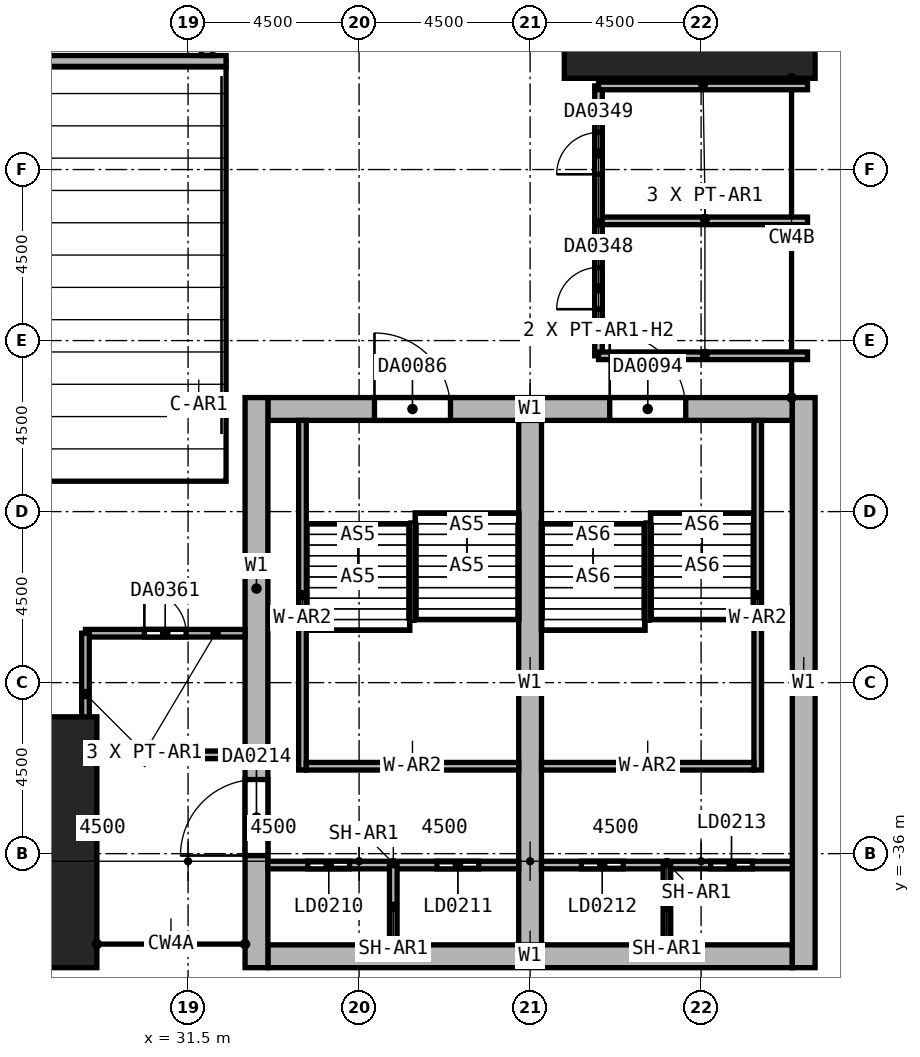
"""IFC4 building model, lengths in metres.
Left out: names, types, materials, properties, quantities, classifications, styles, units other than length and angle.
Written with IfcOpenShell. Run it as: python <this file> out.ifc"""

import sys

from ifc_helpers import new_model, si_unit, direction, frame, frame_2d, origin, origin_2d, place, context, subcontext, project, spatial, rectangle, hollow_rectangle, extrude, element, fill, save


model = new_model("IFC4")
c1 = context("Model", 3, precision=1e-05, world=origin(), true_north=direction((0.0, 1.0)))
c2 = subcontext(c1, "Body", "Model", "MODEL_VIEW")
j1 = project(units=[si_unit("LENGTHUNIT", "METRE"), si_unit("PLANEANGLEUNIT", "RADIAN")], contexts=[c1])
p1 = place(None, origin())
s1 = spatial("IfcSite", under=j1, at=p1, CompositionType="ELEMENT")
p2 = place(p1, origin())
s2 = spatial("IfcBuilding", under=s1, at=p2, CompositionType="ELEMENT")
p3 = place(p2, frame((0.0, 0.0, 12.0)))
s3 = spatial("IfcBuildingStorey", under=s2, at=p3, CompositionType="ELEMENT", Elevation=12.0)
for number, where, z_axis, x_axis in (
    (1, (27.0, -35.7, 0.0), (0.0, 0.0, 1.0), (1.0, 0.0, 0.0)),
    (2, (44.7, -13.5, 0.0), (0.0, 0.0, 1.0), (0.0, 1.0, 0.0)),
):
    element("IfcColumn", number, at=place(p3, frame(where, z_axis=z_axis, x_axis=x_axis)), inside=s3, PredefinedType="COLUMN", context=c2, shape_type="SweptSolid", body=[
        extrude(rectangle(XDim=4.2, YDim=6.6, at=origin_2d()), origin(), (0.0, 0.0, 1.0), 7.0),
    ])
p4 = place(p3, frame((33.6, -24.3, 0.0), z_axis=(0.0, 0.0, 1.0), x_axis=(1.0, 0.0, 0.0)))
e3 = element("IfcWall", 3, at=p4, inside=s3, PredefinedType="SHEAR", context=c2, shape_type="SweptSolid", body=[
    extrude(rectangle(XDim=13.8, YDim=0.6, at=frame_2d((6.9, 0.0))), origin(), (0.0, 0.0, 1.0), 7.0),
])
p5 = place(p4, frame((2.805, 0.0, 0.0)))
e4 = element("IfcOpeningElement", 4, at=p5, cuts=e3, PredefinedType="OPENING", context=c2, shape_type="SweptSolid", body=[
    extrude(rectangle(XDim=2.0, YDim=2.4, at=frame_2d((1.0, 1.2))), frame((0.0, 0.3, 0.0), z_axis=(0.0, -1.0, 0.0), x_axis=(1.0, 0.0, 0.0)), (0.0, 0.0, 1.0), 0.6),
])
p6 = place(p4, frame((8.995, 0.0, 0.0)))
e5 = element("IfcOpeningElement", 5, at=p6, cuts=e3, PredefinedType="OPENING", context=c2, shape_type="SweptSolid", body=[
    extrude(rectangle(XDim=2.0, YDim=2.4, at=frame_2d((1.0, 1.2))), frame((0.0, 0.3, 0.0), z_axis=(0.0, -1.0, 0.0), x_axis=(1.0, 0.0, 0.0)), (0.0, 0.0, 1.0), 0.6),
])
p7 = place(p3, frame((33.6, -38.7, 0.0), z_axis=(0.0, 0.0, 1.0), x_axis=(1.0, 0.0, 0.0)))
e6 = element("IfcWall", 6, at=p7, inside=s3, PredefinedType="SHEAR", context=c2, shape_type="SweptSolid", body=[
    extrude(rectangle(XDim=13.8, YDim=0.6, at=frame_2d((6.9, 0.0))), origin(), (0.0, 0.0, 1.0), 7.0),
])
p8 = place(p3, frame((33.3, -39.0, 0.0), z_axis=(0.0, 0.0, 1.0), x_axis=(0.0, 1.0, 0.0)))
e7 = element("IfcWall", 7, at=p8, inside=s3, PredefinedType="SHEAR", context=c2, shape_type="SweptSolid", body=[
    extrude(rectangle(XDim=15.0, YDim=0.6, at=frame_2d((7.5, 0.0))), origin(), (0.0, 0.0, 1.0), 7.0),
])
p9 = place(p8, frame((2.95, 0.0, 0.0)))
e8 = element("IfcOpeningElement", 8, at=p9, cuts=e7, PredefinedType="OPENING", context=c2, shape_type="SweptSolid", body=[
    extrude(rectangle(XDim=2.0, YDim=2.4, at=frame_2d((1.0, 1.2))), frame((0.0, 0.3, 0.0), z_axis=(0.0, -1.0, 0.0), x_axis=(1.0, 0.0, 0.0)), (0.0, 0.0, 1.0), 0.6),
])
p10 = place(p3, frame((47.7, -39.0, 0.0), z_axis=(0.0, 0.0, 1.0), x_axis=(0.0, 1.0, 0.0)))
e9 = element("IfcWall", 9, at=p10, inside=s3, PredefinedType="SHEAR", context=c2, shape_type="SweptSolid", body=[
    extrude(rectangle(XDim=15.0, YDim=0.6, at=frame_2d((7.5, 0.0))), origin(), (0.0, 0.0, 1.0), 7.0),
])
p11 = place(p3, frame((40.5, -38.4, 0.0), z_axis=(0.0, 0.0, 1.0), x_axis=(0.0, 1.0, 0.0)))
e10 = element("IfcWall", 10, at=p11, inside=s3, PredefinedType="SHEAR", context=c2, shape_type="SweptSolid", body=[
    extrude(rectangle(XDim=13.8, YDim=0.6, at=frame_2d((6.9, 0.0))), origin(), (0.0, 0.0, 1.0), 7.0),
])
p12 = place(p3, frame((32.5, -15.15, 0.0), z_axis=(0.0, 0.0, 1.0), x_axis=(-1.0, 0.0, 0.0)))
e11 = element("IfcWall", 11, at=p12, inside=s3, PredefinedType="SOLIDWALL", context=c2, shape_type="SweptSolid", body=[
    extrude(rectangle(XDim=65.0, YDim=0.3, at=frame_2d((32.5, 0.0))), origin(), (0.0, 0.0, 1.0), 2.125),
])
p13 = place(p3, frame((32.0, -15.0, 0.0), z_axis=(0.0, 0.0, 1.0), x_axis=(0.0, 1.0, 0.0)))
e12 = element("IfcWall", 12, at=p13, inside=s3, PredefinedType="SOLIDWALL", context=c2, shape_type="SweptSolid", body=[
    extrude(rectangle(XDim=13.05, YDim=0.3, at=frame_2d((6.525, 0.0))), origin(), (0.0, 0.0, 1.0), 2.0),
])
p14 = place(p3, frame((31.78, -24.2, 0.0), z_axis=(0.0, 0.0, 1.0), x_axis=(1.0, 0.0, 0.0)))
e13 = element("IfcColumn", 13, at=p14, inside=s3, PredefinedType="COLUMN", context=c2, shape_type="SweptSolid", body=[
    extrude(hollow_rectangle(XDim=0.5, YDim=0.6, WallThickness=0.03, at=origin_2d()), origin(), (0.0, 0.0, 1.0), 5.712),
])
p15 = place(p3, frame((34.51, -33.8, 0.0), z_axis=(0.0, 0.0, 1.0), x_axis=(0.0, 1.0, 0.0)))
e14 = element("IfcWall", 14, at=p15, inside=s3, PredefinedType="SOLIDWALL", context=c2, shape_type="SweptSolid", body=[
    extrude(rectangle(XDim=9.2, YDim=0.2, at=frame_2d((4.6, 0.0))), origin(), (0.0, 0.0, 1.0), 7.0),
])
p16 = place(p3, frame((34.61, -33.7, 0.0), z_axis=(0.0, 0.0, 1.0), x_axis=(1.0, 0.0, 0.0)))
e15 = element("IfcWall", 15, at=p16, inside=s3, PredefinedType="SOLIDWALL", context=c2, shape_type="SweptSolid", body=[
    extrude(rectangle(XDim=5.59, YDim=0.2, at=frame_2d((2.795, 0.0))), origin(), (0.0, 0.0, 1.0), 7.0),
])
p17 = place(p3, frame((46.49, -33.8, 0.0), z_axis=(0.0, 0.0, 1.0), x_axis=(0.0, 1.0, 0.0)))
e16 = element("IfcWall", 16, at=p17, inside=s3, PredefinedType="SOLIDWALL", context=c2, shape_type="SweptSolid", body=[
    extrude(rectangle(XDim=9.2, YDim=0.2, at=frame_2d((4.6, 0.0))), origin(), (0.0, 0.0, 1.0), 7.0),
])
p18 = place(p3, frame((40.8, -33.7, 0.0), z_axis=(0.0, 0.0, 1.0), x_axis=(1.0, 0.0, 0.0)))
e17 = element("IfcWall", 17, at=p18, inside=s3, PredefinedType="SOLIDWALL", context=c2, shape_type="SweptSolid", body=[
    extrude(rectangle(XDim=5.59, YDim=0.2, at=frame_2d((2.795, 0.0))), origin(), (0.0, 0.0, 1.0), 7.0),
])
p19 = place(p3, frame((33.6, -36.3, 0.0), z_axis=(0.0, 0.0, 1.0), x_axis=(1.0, 0.0, 0.0)))
e18 = element("IfcWall", 18, at=p19, inside=s3, PredefinedType="SHEAR", context=c2, shape_type="SweptSolid", body=[
    extrude(rectangle(XDim=6.6, YDim=0.2, at=frame_2d((3.3, 0.0))), origin(), (0.0, 0.0, 1.0), 7.0),
])
p20 = place(p19, frame((1.05, 0.0, 0.0)))
e19 = element("IfcOpeningElement", 19, at=p20, cuts=e18, PredefinedType="OPENING", context=c2, shape_type="SweptSolid", body=[
    extrude(rectangle(XDim=1.1, YDim=2.4, at=frame_2d((0.55, 1.2))), frame((0.0, 0.1, 0.0), z_axis=(0.0, -1.0, 0.0), x_axis=(1.0, 0.0, 0.0)), (0.0, 0.0, 1.0), 0.2),
])
p21 = place(p19, frame((4.45, 0.0, 0.0)))
e20 = element("IfcOpeningElement", 20, at=p21, cuts=e18, PredefinedType="OPENING", context=c2, shape_type="SweptSolid", body=[
    extrude(rectangle(XDim=1.1, YDim=2.4, at=frame_2d((0.55, 1.2))), frame((0.0, 0.1, 0.0), z_axis=(0.0, -1.0, 0.0), x_axis=(1.0, 0.0, 0.0)), (0.0, 0.0, 1.0), 0.2),
])
p22 = place(p3, frame((40.8, -36.3, 0.0), z_axis=(0.0, 0.0, 1.0), x_axis=(1.0, 0.0, 0.0)))
e21 = element("IfcWall", 21, at=p22, inside=s3, PredefinedType="SHEAR", context=c2, shape_type="SweptSolid", body=[
    extrude(rectangle(XDim=6.6, YDim=0.2, at=frame_2d((3.3, 0.0))), origin(), (0.0, 0.0, 1.0), 7.0),
])
p23 = place(p22, frame((1.05, 0.0, 0.0)))
e22 = element("IfcOpeningElement", 22, at=p23, cuts=e21, PredefinedType="OPENING", context=c2, shape_type="SweptSolid", body=[
    extrude(rectangle(XDim=1.1, YDim=2.4, at=frame_2d((0.55, 1.2))), frame((0.0, 0.1, 0.0), z_axis=(0.0, -1.0, 0.0), x_axis=(1.0, 0.0, 0.0)), (0.0, 0.0, 1.0), 0.2),
])
p24 = place(p22, frame((4.45, 0.0, 0.0)))
e23 = element("IfcOpeningElement", 23, at=p24, cuts=e21, PredefinedType="OPENING", context=c2, shape_type="SweptSolid", body=[
    extrude(rectangle(XDim=1.1, YDim=2.4, at=frame_2d((0.55, 1.2))), frame((0.0, 0.1, 0.0), z_axis=(0.0, -1.0, 0.0), x_axis=(1.0, 0.0, 0.0)), (0.0, 0.0, 1.0), 0.2),
])
for number, where, z_axis, x_axis in (
    (24, (36.9, -38.4, 0.0), (0.0, 0.0, 1.0), (0.0, 1.0, 0.0)),
    (25, (44.1, -38.4, 0.0), (0.0, 0.0, 1.0), (0.0, 1.0, 0.0)),
):
    element("IfcWall", number, at=place(p3, frame(where, z_axis=z_axis, x_axis=x_axis)), inside=s3, PredefinedType="SHEAR", context=c2, shape_type="SweptSolid", body=[
        extrude(rectangle(XDim=2.1, YDim=0.2, at=frame_2d((1.05, 0.0))), origin(), (0.0, 0.0, 1.0), 7.0),
    ])
p25 = place(p3, frame((42.3, -22.9, 0.0), z_axis=(0.0, 0.0, 1.0), x_axis=(0.0, 1.0, 0.0)))
e26 = element("IfcWall", 26, at=p25, inside=s3, PredefinedType="PARTITIONING", context=c2, shape_type="SweptSolid", body=[
    extrude(rectangle(XDim=3.55, YDim=0.2, at=frame_2d((1.775, 0.0))), origin(), (0.0, 0.0, 1.0), 5.5),
])
p26 = place(p25, frame((1.225, 0.0, 0.0)))
e27 = element("IfcOpeningElement", 27, at=p26, cuts=e26, PredefinedType="OPENING", context=c2, shape_type="SweptSolid", body=[
    extrude(rectangle(XDim=1.1, YDim=2.4, at=frame_2d((0.55, 1.2))), frame((0.0, 0.1, 0.0), z_axis=(0.0, -1.0, 0.0), x_axis=(1.0, 0.0, 0.0)), (0.0, 0.0, 1.0), 0.2),
])
for number, where, z_axis, x_axis in (
    (28, (42.3, -22.9, 0.0), (0.0, 0.0, 1.0), (1.0, 0.0, 0.0)),
    (29, (42.3, -19.35, 0.0), (0.0, 0.0, 1.0), (1.0, 0.0, 0.0)),
):
    element("IfcWall", number, at=place(p3, frame(where, z_axis=z_axis, x_axis=x_axis)), inside=s3, PredefinedType="PARTITIONING", context=c2, shape_type="SweptSolid", body=[
        extrude(rectangle(XDim=5.5, YDim=0.2, at=frame_2d((2.75, 0.0))), origin(), (0.0, 0.0, 1.0), 6.7),
    ])
p27 = place(p3, frame((42.3, -19.35, 0.0), z_axis=(0.0, 0.0, 1.0), x_axis=(0.0, 1.0, 0.0)))
e30 = element("IfcWall", 30, at=p27, inside=s3, PredefinedType="PARTITIONING", context=c2, shape_type="SweptSolid", body=[
    extrude(rectangle(XDim=3.55, YDim=0.2, at=frame_2d((1.775, 0.0))), origin(), (0.0, 0.0, 1.0), 5.5),
])
p28 = place(p27, frame((1.225, 0.0, 0.0)))
e31 = element("IfcOpeningElement", 31, at=p28, cuts=e30, PredefinedType="OPENING", context=c2, shape_type="SweptSolid", body=[
    extrude(rectangle(XDim=1.1, YDim=2.4, at=frame_2d((0.55, 1.2))), frame((0.0, 0.1, 0.0), z_axis=(0.0, -1.0, 0.0), x_axis=(1.0, 0.0, 0.0)), (0.0, 0.0, 1.0), 0.2),
])
p29 = place(p3, frame((42.3, -15.8, 0.0), z_axis=(0.0, 0.0, 1.0), x_axis=(1.0, 0.0, 0.0)))
e32 = element("IfcWall", 32, at=p29, inside=s3, PredefinedType="PARTITIONING", context=c2, shape_type="SweptSolid", body=[
    extrude(rectangle(XDim=5.5, YDim=0.2, at=frame_2d((2.75, 0.0))), origin(), (0.0, 0.0, 1.0), 6.7),
])
p30 = place(p3, frame((28.8, -30.2, 0.0), z_axis=(0.0, 0.0, 1.0), x_axis=(1.0, 0.0, 0.0)))
e33 = element("IfcWall", 33, at=p30, inside=s3, PredefinedType="PARTITIONING", context=c2, shape_type="SweptSolid", body=[
    extrude(rectangle(XDim=4.2, YDim=0.2, at=frame_2d((2.1, 0.0))), origin(), (0.0, 0.0, 1.0), 6.7),
])
p31 = place(p30, frame((1.55, 0.0, 0.0)))
e34 = element("IfcOpeningElement", 34, at=p31, cuts=e33, PredefinedType="OPENING", context=c2, shape_type="SweptSolid", body=[
    extrude(rectangle(XDim=1.1, YDim=2.4, at=frame_2d((0.55, 1.2))), frame((0.0, 0.1, 0.0), z_axis=(0.0, -1.0, 0.0), x_axis=(1.0, 0.0, 0.0)), (0.0, 0.0, 1.0), 0.2),
])
p32 = place(p3, frame((28.8, -33.4, 0.0), z_axis=(0.0, 0.0, 1.0), x_axis=(0.0, 1.0, 0.0)))
e35 = element("IfcWall", 35, at=p32, inside=s3, PredefinedType="PARTITIONING", context=c2, shape_type="SweptSolid", body=[
    extrude(rectangle(XDim=3.2, YDim=0.2, at=frame_2d((1.6, 0.0))), origin(), (0.0, 0.0, 1.0), 6.7),
])
p33 = place(p3, frame((28.8, -33.4, 0.0), z_axis=(0.0, 0.0, 1.0), x_axis=(1.0, 0.0, 0.0)))
e36 = element("IfcWall", 36, at=p33, inside=s3, PredefinedType="PARTITIONING", context=c2, shape_type="SweptSolid", body=[
    extrude(rectangle(XDim=4.2, YDim=0.2, at=frame_2d((2.1, 0.0))), origin(), (0.0, 0.0, 1.0), 6.7),
])
p34 = place(p5, frame((2.0, 0.0, 0.0), z_axis=(0.0, 0.0, 1.0), x_axis=(-1.0, 0.0, 0.0)))
e37 = element("IfcDoor", 37, at=p34, inside=s3, OperationType="DOUBLE_DOOR_SINGLE_SWING", PredefinedType="DOOR", context=c2, shape_type="SweptSolid", body=[
    extrude(rectangle(XDim=2.0, YDim=2.4, at=frame_2d((1.0, 1.2))), frame((0.0, 0.025, 0.0), z_axis=(0.0, -1.0, 0.0), x_axis=(1.0, 0.0, 0.0)), (0.0, 0.0, 1.0), 0.05),
])
fill(e4, e37)
p35 = place(p6, frame((2.0, 0.0, 0.0), z_axis=(0.0, 0.0, 1.0), x_axis=(-1.0, 0.0, 0.0)))
e38 = element("IfcDoor", 38, at=p35, inside=s3, OperationType="DOUBLE_DOOR_SINGLE_SWING", PredefinedType="DOOR", context=c2, shape_type="SweptSolid", body=[
    extrude(rectangle(XDim=2.0, YDim=2.4, at=frame_2d((1.0, 1.2))), frame((0.0, 0.025, 0.0), z_axis=(0.0, -1.0, 0.0), x_axis=(1.0, 0.0, 0.0)), (0.0, 0.0, 1.0), 0.05),
])
fill(e5, e38)
p36 = place(p20, frame((1.1, 0.0, 0.0), z_axis=(0.0, 0.0, 1.0), x_axis=(-1.0, 0.0, 0.0)))
e39 = element("IfcDoor", 39, at=p36, inside=s3, OperationType="DOUBLE_DOOR_SLIDING", PredefinedType="DOOR", context=c2, shape_type="SweptSolid", body=[
    extrude(rectangle(XDim=1.1, YDim=2.4, at=frame_2d((0.55, 1.2))), frame((0.0, 0.025, 0.0), z_axis=(0.0, -1.0, 0.0), x_axis=(1.0, 0.0, 0.0)), (0.0, 0.0, 1.0), 0.05),
])
fill(e19, e39)
p37 = place(p21, frame((1.1, 0.0, 0.0), z_axis=(0.0, 0.0, 1.0), x_axis=(-1.0, 0.0, 0.0)))
e40 = element("IfcDoor", 40, at=p37, inside=s3, OperationType="DOUBLE_DOOR_SLIDING", PredefinedType="DOOR", context=c2, shape_type="SweptSolid", body=[
    extrude(rectangle(XDim=1.1, YDim=2.4, at=frame_2d((0.55, 1.2))), frame((0.0, 0.025, 0.0), z_axis=(0.0, -1.0, 0.0), x_axis=(1.0, 0.0, 0.0)), (0.0, 0.0, 1.0), 0.05),
])
fill(e20, e40)
p38 = place(p23, frame((1.1, 0.0, 0.0), z_axis=(0.0, 0.0, 1.0), x_axis=(-1.0, 0.0, 0.0)))
e41 = element("IfcDoor", 41, at=p38, inside=s3, OperationType="DOUBLE_DOOR_SLIDING", PredefinedType="DOOR", context=c2, shape_type="SweptSolid", body=[
    extrude(rectangle(XDim=1.1, YDim=2.4, at=frame_2d((0.55, 1.2))), frame((0.0, 0.025, 0.0), z_axis=(0.0, -1.0, 0.0), x_axis=(1.0, 0.0, 0.0)), (0.0, 0.0, 1.0), 0.05),
])
fill(e22, e41)
p39 = place(p24, frame((1.1, 0.0, 0.0), z_axis=(0.0, 0.0, 1.0), x_axis=(-1.0, 0.0, 0.0)))
e42 = element("IfcDoor", 42, at=p39, inside=s3, OperationType="DOUBLE_DOOR_SLIDING", PredefinedType="DOOR", context=c2, shape_type="SweptSolid", body=[
    extrude(rectangle(XDim=1.1, YDim=2.4, at=frame_2d((0.55, 1.2))), frame((0.0, 0.025, 0.0), z_axis=(0.0, -1.0, 0.0), x_axis=(1.0, 0.0, 0.0)), (0.0, 0.0, 1.0), 0.05),
])
fill(e23, e42)
p40 = place(p9, origin())
e43 = element("IfcDoor", 43, at=p40, inside=s3, OperationType="DOUBLE_DOOR_SINGLE_SWING", PredefinedType="DOOR", context=c2, shape_type="SweptSolid", body=[
    extrude(rectangle(XDim=2.0, YDim=2.4, at=frame_2d((1.0, 1.2))), frame((0.0, 0.025, 0.0), z_axis=(0.0, -1.0, 0.0), x_axis=(1.0, 0.0, 0.0)), (0.0, 0.0, 1.0), 0.05),
])
fill(e8, e43)
p41 = place(p26, origin())
e44 = element("IfcDoor", 44, at=p41, inside=s3, OperationType="DOUBLE_DOOR_SINGLE_SWING", PredefinedType="DOOR", context=c2, shape_type="SweptSolid", body=[
    extrude(rectangle(XDim=1.1, YDim=2.4, at=frame_2d((0.55, 1.2))), frame((0.0, 0.025, 0.0), z_axis=(0.0, -1.0, 0.0), x_axis=(1.0, 0.0, 0.0)), (0.0, 0.0, 1.0), 0.05),
])
fill(e27, e44)
p42 = place(p28, origin())
e45 = element("IfcDoor", 45, at=p42, inside=s3, OperationType="DOUBLE_DOOR_SINGLE_SWING", PredefinedType="DOOR", context=c2, shape_type="SweptSolid", body=[
    extrude(rectangle(XDim=1.1, YDim=2.4, at=frame_2d((0.55, 1.2))), frame((0.0, 0.025, 0.0), z_axis=(0.0, -1.0, 0.0), x_axis=(1.0, 0.0, 0.0)), (0.0, 0.0, 1.0), 0.05),
])
fill(e31, e45)
p43 = place(p31, origin())
e46 = element("IfcDoor", 46, at=p43, inside=s3, OperationType="DOUBLE_DOOR_SINGLE_SWING", PredefinedType="DOOR", context=c2, shape_type="SweptSolid", body=[
    extrude(rectangle(XDim=1.1, YDim=2.4, at=frame_2d((0.55, 1.2))), frame((0.0, 0.025, 0.0), z_axis=(0.0, -1.0, 0.0), x_axis=(1.0, 0.0, 0.0)), (0.0, 0.0, 1.0), 0.05),
])
fill(e34, e46)
save(model, sys.argv[1])
